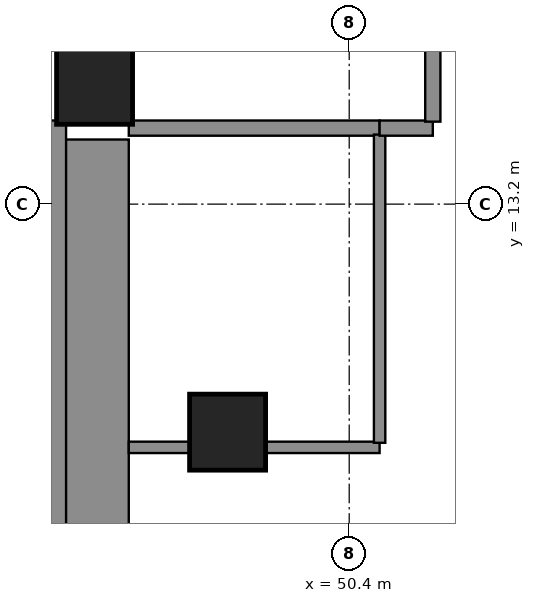
"""IFC4 building model, lengths in metres.
Left out: names, types, materials, properties, quantities, classifications, styles, units other than length and angle.
Written with IfcOpenShell. Run it as: python <this file> out.ifc"""

import sys

from ifc_helpers import new_model, si_unit, direction, frame, frame_2d, origin, origin_2d, place, context, subcontext, project, spatial, rectangle, extrude, element, fill, save


model = new_model("IFC4")
c1 = context("Model", 3, precision=1e-05, world=origin(), true_north=direction((0.0, 1.0)))
c2 = subcontext(c1, "Body", "Model", "MODEL_VIEW")
j1 = project(units=[si_unit("LENGTHUNIT", "METRE"), si_unit("PLANEANGLEUNIT", "RADIAN")], contexts=[c1])
p1 = place(None, origin())
s1 = spatial("IfcSite", under=j1, at=p1, CompositionType="ELEMENT")
p2 = place(p1, origin())
s2 = spatial("IfcBuilding", under=s1, at=p2, CompositionType="ELEMENT")
p3 = place(p2, frame((0.0, 0.0, 100.2)))
s3 = spatial("IfcBuildingStorey", under=s2, at=p3, CompositionType="ELEMENT", Elevation=100.2)
p4 = place(p3, frame((47.05, 14.75, 0.0), z_axis=(0.0, 0.0, 1.0), x_axis=(1.0, 0.0, 0.0)))
e1 = element("IfcColumn", 1, at=p4, inside=s3, PredefinedType="COLUMN", context=c2, shape_type="SweptSolid", body=[
    extrude(rectangle(XDim=1.4, YDim=1.4, at=origin_2d()), origin(), (0.0, 0.0, 1.0), 4.8),
])
p5 = place(p3, frame((48.8, 10.2, 0.0), z_axis=(0.0, 0.0, 1.0), x_axis=(1.0, 0.0, 0.0)))
e2 = element("IfcColumn", 2, at=p5, inside=s3, PredefinedType="COLUMN", context=c2, shape_type="SweptSolid", body=[
    extrude(rectangle(XDim=1.2, YDim=1.2, at=origin_2d()), origin(), (0.0, 0.0, 1.0), 4.8),
])
p6 = place(p3, frame((47.05, 5.25, 0.0), z_axis=(0.0, 0.0, 1.0), x_axis=(0.0, 1.0, 0.0)))
e3 = element("IfcWall", 3, at=p6, inside=s3, PredefinedType="SHEAR", context=c2, shape_type="SweptSolid", body=[
    extrude(rectangle(XDim=8.8, YDim=0.9, at=frame_2d((4.4, 0.0))), origin(), (0.0, 0.0, 1.0), 4.8),
])
p7 = place(p3, frame((46.5, 5.2, 0.0), z_axis=(0.0, 0.0, 1.0), x_axis=(0.0, 1.0, 0.0)))
e4 = element("IfcWall", 4, at=p7, inside=s3, PredefinedType="SOLIDWALL", context=c2, shape_type="SweptSolid", body=[
    extrude(rectangle(XDim=9.1, YDim=0.35, at=frame_2d((4.55, 0.0))), origin(), (0.0, 0.0, 1.0), 4.8),
])
p8 = place(p3, frame((47.5, 10.0, 0.0), z_axis=(0.0, 0.0, 1.0), x_axis=(1.0, 0.0, 0.0)))
e5 = element("IfcWall", 5, at=p8, inside=s3, PredefinedType="PARTITIONING", context=c2, shape_type="SweptSolid", body=[
    extrude(rectangle(XDim=3.3, YDim=0.15, at=frame_2d((1.65, 0.0))), origin(), (0.0, 0.0, 1.0), 2.27),
])
p9 = place(p3, frame((50.8, 14.2, 0.0), z_axis=(0.0, 0.0, 1.0), x_axis=(-1.0, 0.0, 0.0)))
e6 = element("IfcWall", 6, at=p9, inside=s3, PredefinedType="PARTITIONING", context=c2, shape_type="SweptSolid", body=[
    extrude(rectangle(XDim=3.3, YDim=0.2, at=frame_2d((1.65, 0.0))), origin(), (0.0, 0.0, 1.0), 4.061),
])
p10 = place(p9, frame((1.2, 0.0, 0.0)))
e7 = element("IfcOpeningElement", 7, at=p10, cuts=e6, PredefinedType="OPENING", context=c2, shape_type="SweptSolid", body=[
    extrude(rectangle(XDim=0.9, YDim=2.1, at=frame_2d((0.45, 1.05))), frame((0.0, 0.11, 0.0), z_axis=(0.0, -1.0, 0.0), x_axis=(1.0, 0.0, 0.0)), (0.0, 0.0, 1.0), 0.22),
])
p11 = place(p3, frame((50.8, 10.06, 0.0), z_axis=(0.0, 0.0, 1.0), x_axis=(0.0, 1.0, 0.0)))
e8 = element("IfcWall", 8, at=p11, inside=s3, PredefinedType="PARTITIONING", context=c2, shape_type="SweptSolid", body=[
    extrude(rectangle(XDim=4.055, YDim=0.15, at=frame_2d((2.027, 0.0))), origin(), (0.0, 0.0, 1.0), 2.27),
])
p12 = place(p3, frame((50.8, 14.2, 0.0), z_axis=(0.0, 0.0, 1.0), x_axis=(1.0, 0.0, 0.0)))
e9 = element("IfcWall", 9, at=p12, inside=s3, PredefinedType="PARTITIONING", context=c2, shape_type="SweptSolid", body=[
    extrude(rectangle(XDim=0.7, YDim=0.2, at=frame_2d((0.35, 0.0))), origin(), (0.0, 0.0, 1.0), 4.061),
])
p13 = place(p3, frame((51.5, 14.285, 0.0), z_axis=(0.0, 0.0, 1.0), x_axis=(0.0, 1.0, 0.0)))
e10 = element("IfcWall", 10, at=p13, inside=s3, PredefinedType="PARTITIONING", context=c2, shape_type="SweptSolid", body=[
    extrude(rectangle(XDim=3.365, YDim=0.2, at=frame_2d((1.683, 0.0))), origin(), (0.0, 0.0, 1.0), 4.5),
])
p14 = place(p10, origin())
e11 = element("IfcDoor", 11, at=p14, inside=s3, OperationType="SINGLE_SWING_RIGHT", PredefinedType="DOOR", context=c2, shape_type="SweptSolid", body=[
    extrude(rectangle(XDim=0.9, YDim=2.1, at=frame_2d((0.45, 1.05))), frame((0.0, 0.025, 0.0), z_axis=(0.0, -1.0, 0.0), x_axis=(1.0, 0.0, 0.0)), (0.0, 0.0, 1.0), 0.05),
])
fill(e7, e11)
save(model, sys.argv[1])
